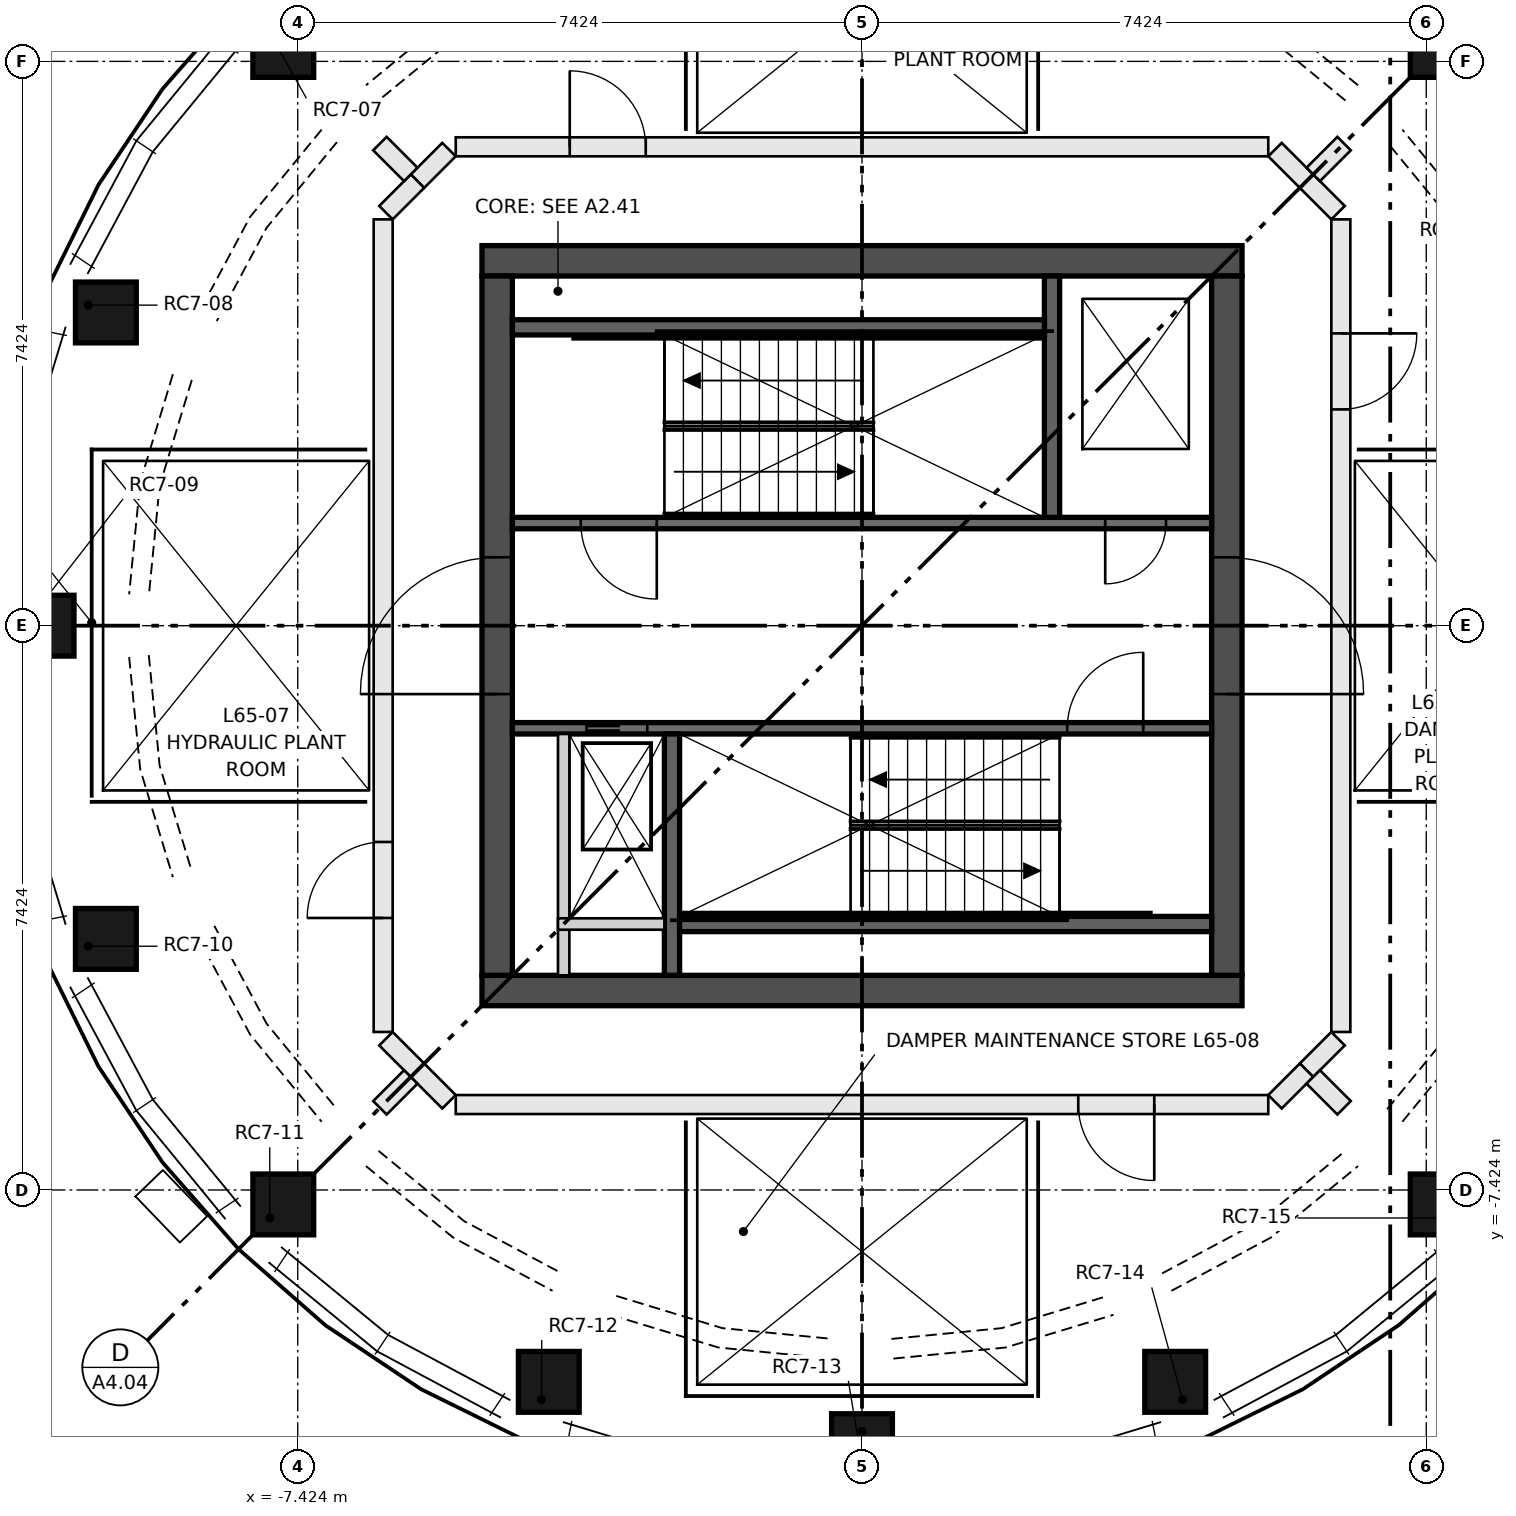
"""IFC4 building model, lengths in metres.
Left out: names, types, materials, properties, quantities, classifications, styles, units other than length and angle.
Written with IfcOpenShell. Run it as: python <this file> out.ifc"""

import sys

from ifc_helpers import new_model, si_unit, direction, frame, frame_2d, origin, origin_2d, place, context, subcontext, project, spatial, rectangle, extrude, element, fill, save


model = new_model("IFC4")
c1 = context("Model", 3, precision=1e-05, world=origin(), true_north=direction((0.0, 1.0)))
c2 = subcontext(c1, "Body", "Model", "MODEL_VIEW")
j1 = project(units=[si_unit("LENGTHUNIT", "METRE"), si_unit("PLANEANGLEUNIT", "RADIAN")], contexts=[c1])
p1 = place(None, origin())
s1 = spatial("IfcSite", under=j1, at=p1, CompositionType="ELEMENT")
p2 = place(p1, origin())
s2 = spatial("IfcBuilding", under=s1, at=p2, CompositionType="ELEMENT")
p3 = place(p2, frame((0.0, 0.0, 239.4)))
s3 = spatial("IfcBuildingStorey", under=s2, at=p3, CompositionType="ELEMENT", Elevation=239.4)
for number, where, z_axis, x_axis in (
    (1, (7.792, 7.792, 0.5), (0.0, 0.0, 1.0), (0.707, -0.707, 0.0)),
    (2, (-7.792, 7.792, 0.5), (0.0, 0.0, 1.0), (0.707, 0.707, 0.0)),
):
    element("IfcColumn", number, at=place(p3, frame(where, z_axis=z_axis, x_axis=x_axis)), inside=s3, PredefinedType="COLUMN", context=c2, shape_type="SweptSolid", body=[
        extrude(rectangle(XDim=0.8, YDim=0.8, at=origin_2d()), origin(), (0.0, -0.339, 0.941), 4.251),
    ])
p4 = place(p3, frame((-10.181, 4.217, 0.5), z_axis=(0.0, 0.0, 1.0), x_axis=(0.382820947077, 0.923822560062, 0.0)))
e3 = element("IfcColumn", 3, at=p4, inside=s3, PredefinedType="COLUMN", context=c2, shape_type="SweptSolid", body=[
    extrude(rectangle(XDim=0.8, YDim=0.8, at=origin_2d()), origin(), (0.0, -0.339, 0.941), 4.251),
])
p5 = place(p3, frame((-11.02, 0.0, 0.5), z_axis=(0.0, 0.0, 1.0), x_axis=(0.0, 1.0, 0.0)))
e4 = element("IfcColumn", 4, at=p5, inside=s3, PredefinedType="COLUMN", context=c2, shape_type="SweptSolid", body=[
    extrude(rectangle(XDim=0.8, YDim=0.8, at=origin_2d()), origin(), (0.0, -0.339, 0.941), 4.251),
])
p6 = place(p3, frame((-10.181, -4.217, 0.5), z_axis=(0.0, 0.0, 1.0), x_axis=(-0.382820947077, 0.923822560062, 0.0)))
e5 = element("IfcColumn", 5, at=p6, inside=s3, PredefinedType="COLUMN", context=c2, shape_type="SweptSolid", body=[
    extrude(rectangle(XDim=0.8, YDim=0.8, at=origin_2d()), origin(), (0.0, -0.339, 0.941), 4.251),
])
p7 = place(p3, frame((-7.792, -7.792, 0.5), z_axis=(0.0, 0.0, 1.0), x_axis=(-0.707106781187, 0.707106781187, 0.0)))
e6 = element("IfcColumn", 6, at=p7, inside=s3, PredefinedType="COLUMN", context=c2, shape_type="SweptSolid", body=[
    extrude(rectangle(XDim=0.8, YDim=0.8, at=origin_2d()), origin(), (0.0, -0.339, 0.941), 4.251),
])
p8 = place(p3, frame((-4.217, -10.181, 0.5), z_axis=(0.0, 0.0, 1.0), x_axis=(-0.923822560062, 0.382820947077, 0.0)))
e7 = element("IfcColumn", 7, at=p8, inside=s3, PredefinedType="COLUMN", context=c2, shape_type="SweptSolid", body=[
    extrude(rectangle(XDim=0.8, YDim=0.8, at=origin_2d()), origin(), (0.0, -0.339, 0.941), 4.251),
])
p9 = place(p3, frame((0.0, -11.02, 0.5), z_axis=(0.0, 0.0, 1.0), x_axis=(-1.0, 0.0, 0.0)))
e8 = element("IfcColumn", 8, at=p9, inside=s3, PredefinedType="COLUMN", context=c2, shape_type="SweptSolid", body=[
    extrude(rectangle(XDim=0.8, YDim=0.8, at=origin_2d()), origin(), (0.0, -0.339, 0.941), 4.251),
])
p10 = place(p3, frame((4.217, -10.181, 0.5), z_axis=(0.0, 0.0, 1.0), x_axis=(-0.923822560062, -0.382820947077, 0.0)))
e9 = element("IfcColumn", 9, at=p10, inside=s3, PredefinedType="COLUMN", context=c2, shape_type="SweptSolid", body=[
    extrude(rectangle(XDim=0.8, YDim=0.8, at=origin_2d()), origin(), (0.0, -0.339, 0.941), 4.251),
])
p11 = place(p3, frame((7.792, -7.792, 0.5), z_axis=(0.0, 0.0, 1.0), x_axis=(-0.707106781187, -0.707106781187, 0.0)))
e10 = element("IfcColumn", 10, at=p11, inside=s3, PredefinedType="COLUMN", context=c2, shape_type="SweptSolid", body=[
    extrude(rectangle(XDim=0.8, YDim=0.8, at=origin_2d()), origin(), (0.0, -0.339, 0.941), 4.251),
])
for number, where, z_axis, x_axis in (
    (11, (-5.0, -4.8, 0.0), (0.0, 0.0, 1.0), (1.0, 0.0, 0.0)),
    (12, (-5.0, 4.8, 0.0), (0.0, 0.0, 1.0), (1.0, 0.0, 0.0)),
):
    element("IfcWall", number, at=place(p3, frame(where, z_axis=z_axis, x_axis=x_axis)), inside=s3, PredefinedType="SHEAR", context=c2, shape_type="SweptSolid", body=[
        extrude(rectangle(XDim=10.0, YDim=0.4, at=frame_2d((5.0, 0.0))), origin(), (0.0, 0.0, 1.0), 4.65),
    ])
p12 = place(p3, frame((-4.8, -4.6, 0.0), z_axis=(0.0, 0.0, 1.0), x_axis=(0.0, 1.0, 0.0)))
e13 = element("IfcWall", 13, at=p12, inside=s3, PredefinedType="SHEAR", context=c2, shape_type="SweptSolid", body=[
    extrude(rectangle(XDim=9.2, YDim=0.4, at=frame_2d((4.6, 0.0))), origin(), (0.0, 0.0, 1.0), 4.65),
])
p13 = place(p12, frame((3.7, 0.0, 0.0)))
e14 = element("IfcOpeningElement", 14, at=p13, cuts=e13, PredefinedType="OPENING", context=c2, shape_type="SweptSolid", body=[
    extrude(rectangle(XDim=1.8, YDim=2.1, at=frame_2d((0.9, 1.05))), frame((0.0, 0.21, 0.0), z_axis=(0.0, -1.0, 0.0), x_axis=(1.0, 0.0, 0.0)), (0.0, 0.0, 1.0), 0.42),
])
p14 = place(p3, frame((4.8, -4.6, 0.0), z_axis=(0.0, 0.0, 1.0), x_axis=(0.0, 1.0, 0.0)))
e15 = element("IfcWall", 15, at=p14, inside=s3, PredefinedType="SHEAR", context=c2, shape_type="SweptSolid", body=[
    extrude(rectangle(XDim=9.2, YDim=0.4, at=frame_2d((4.6, 0.0))), origin(), (0.0, 0.0, 1.0), 4.65),
])
p15 = place(p14, frame((3.7, 0.0, 0.0)))
e16 = element("IfcOpeningElement", 16, at=p15, cuts=e15, PredefinedType="OPENING", context=c2, shape_type="SweptSolid", body=[
    extrude(rectangle(XDim=1.8, YDim=2.1, at=frame_2d((0.9, 1.05))), frame((0.0, 0.21, 0.0), z_axis=(0.0, -1.0, 0.0), x_axis=(1.0, 0.0, 0.0)), (0.0, 0.0, 1.0), 0.42),
])
p16 = place(p3, frame((-4.6, 1.35, 0.0), z_axis=(0.0, 0.0, 1.0), x_axis=(1.0, 0.0, 0.0)))
e17 = element("IfcWall", 17, at=p16, inside=s3, PredefinedType="SHEAR", context=c2, shape_type="SweptSolid", body=[
    extrude(rectangle(XDim=9.2, YDim=0.15, at=frame_2d((4.6, 0.0))), origin(), (0.0, 0.0, 1.0), 4.65),
])
p17 = place(p16, frame((0.9, 0.0, 0.0)))
e18 = element("IfcOpeningElement", 18, at=p17, cuts=e17, PredefinedType="OPENING", context=c2, shape_type="SweptSolid", body=[
    extrude(rectangle(XDim=1.0, YDim=2.1, at=frame_2d((0.5, 1.05))), frame((0.0, 0.085, 0.0), z_axis=(0.0, -1.0, 0.0), x_axis=(1.0, 0.0, 0.0)), (0.0, 0.0, 1.0), 0.17),
])
p18 = place(p16, frame((7.8, 0.0, 0.0)))
e19 = element("IfcOpeningElement", 19, at=p18, cuts=e17, PredefinedType="OPENING", context=c2, shape_type="SweptSolid", body=[
    extrude(rectangle(XDim=0.8, YDim=2.1, at=frame_2d((0.4, 1.05))), frame((0.0, 0.085, 0.0), z_axis=(0.0, -1.0, 0.0), x_axis=(1.0, 0.0, 0.0)), (0.0, 0.0, 1.0), 0.17),
])
p19 = place(p3, frame((-4.6, -1.35, 0.0), z_axis=(0.0, 0.0, 1.0), x_axis=(1.0, 0.0, 0.0)))
e20 = element("IfcWall", 20, at=p19, inside=s3, PredefinedType="SHEAR", context=c2, shape_type="SweptSolid", body=[
    extrude(rectangle(XDim=9.2, YDim=0.15, at=frame_2d((4.6, 0.0))), origin(), (0.0, 0.0, 1.0), 4.65),
])
p20 = place(p19, frame((0.975, 0.0, 0.0)))
e21 = element("IfcOpeningElement", 21, at=p20, cuts=e20, PredefinedType="OPENING", context=c2, shape_type="SweptSolid", body=[
    extrude(rectangle(XDim=0.8, YDim=2.1, at=frame_2d((0.4, 1.05))), frame((0.0, 0.085, 0.0), z_axis=(0.0, -1.0, 0.0), x_axis=(1.0, 0.0, 0.0)), (0.0, 0.0, 1.0), 0.17),
])
p21 = place(p19, frame((7.3, 0.0, 0.0)))
e22 = element("IfcOpeningElement", 22, at=p21, cuts=e20, PredefinedType="OPENING", context=c2, shape_type="SweptSolid", body=[
    extrude(rectangle(XDim=1.0, YDim=2.1, at=frame_2d((0.5, 1.05))), frame((0.0, 0.085, 0.0), z_axis=(0.0, -1.0, 0.0), x_axis=(1.0, 0.0, 0.0)), (0.0, 0.0, 1.0), 0.17),
])
for number, where, z_axis, x_axis in (
    (23, (2.5, 1.425, 0.0), (0.0, 0.0, 1.0), (0.0, 1.0, 0.0)),
    (24, (-2.5, -1.425, 0.0), (0.0, 0.0, 1.0), (0.0, -1.0, 0.0)),
):
    element("IfcWall", number, at=place(p3, frame(where, z_axis=z_axis, x_axis=x_axis)), inside=s3, PredefinedType="SHEAR", context=c2, shape_type="SweptSolid", body=[
        extrude(rectangle(XDim=3.175, YDim=0.2, at=frame_2d((1.587, 0.0))), origin(), (0.0, 0.0, 1.0), 4.65),
    ])
for number, where, z_axis, x_axis in (
    (25, (-4.6, 3.925, 0.0), (0.0, 0.0, 1.0), (1.0, 0.0, 0.0)),
    (26, (4.6, -3.925, 0.0), (0.0, 0.0, 1.0), (-1.0, 0.0, 0.0)),
):
    element("IfcWall", number, at=place(p3, frame(where, z_axis=z_axis, x_axis=x_axis)), inside=s3, PredefinedType="SHEAR", context=c2, shape_type="SweptSolid", body=[
        extrude(rectangle(XDim=7.0, YDim=0.2, at=frame_2d((3.5, 0.0))), origin(), (0.0, 0.0, 1.0), 4.65),
    ])
p22 = place(p3, frame((-3.925, -4.6, 0.0), z_axis=(0.0, 0.0, 1.0), x_axis=(0.0, 1.0, 0.0)))
e27 = element("IfcWall", 27, at=p22, inside=s3, PredefinedType="PARTITIONING", context=c2, shape_type="SweptSolid", body=[
    extrude(rectangle(XDim=3.175, YDim=0.15, at=frame_2d((1.587, 0.0))), origin(), (0.0, 0.0, 1.0), 4.65),
])
p23 = place(p3, frame((-4.0, -3.925, 0.0), z_axis=(0.0, 0.0, 1.0), x_axis=(1.0, 0.0, 0.0)))
e28 = element("IfcWall", 28, at=p23, inside=s3, PredefinedType="PARTITIONING", context=c2, shape_type="SweptSolid", body=[
    extrude(rectangle(XDim=1.4, YDim=0.15, at=frame_2d((0.7, 0.0))), origin(), (0.0, 0.0, 1.0), 4.65),
])
for number, where, z_axis, x_axis in (
    (29, (5.848, 5.848, 0.0), (0.0, 0.0, 1.0), (0.707, -0.707, 0.0)),
    (30, (6.263, -5.434, 0.0), (0.0, 0.0, 1.0), (-0.707, -0.707, 0.0)),
):
    element("IfcWall", number, at=place(p3, frame(where, z_axis=z_axis, x_axis=x_axis)), inside=s3, PredefinedType="PARTITIONING", context=c2, shape_type="SweptSolid", body=[
        extrude(rectangle(XDim=0.587, YDim=0.25, at=frame_2d((0.293, 0.0))), origin(), (0.0, 0.0, 1.0), 4.65),
    ])
p24 = place(p3, frame((6.3, 5.345, 0.0), z_axis=(0.0, 0.0, 1.0), x_axis=(0.0, -1.0, 0.0)))
e31 = element("IfcWall", 31, at=p24, inside=s3, PredefinedType="PARTITIONING", context=c2, shape_type="SweptSolid", body=[
    extrude(rectangle(XDim=10.69, YDim=0.25, at=frame_2d((5.345, 0.0))), origin(), (0.0, 0.0, 1.0), 4.65),
])
p25 = place(p24, frame((1.5, 0.0, 0.0)))
e32 = element("IfcOpeningElement", 32, at=p25, cuts=e31, PredefinedType="OPENING", context=c2, shape_type="SweptSolid", body=[
    extrude(rectangle(XDim=1.0, YDim=2.1, at=frame_2d((0.5, 1.05))), frame((0.0, 0.135, 0.0), z_axis=(0.0, -1.0, 0.0), x_axis=(1.0, 0.0, 0.0)), (0.0, 0.0, 1.0), 0.27),
])
p26 = place(p3, frame((-5.848, 5.848, 0.0), z_axis=(0.0, 0.0, 1.0), x_axis=(0.706898716824, 0.707314784344, 0.0)))
e33 = element("IfcWall", 33, at=p26, inside=s3, PredefinedType="PARTITIONING", context=c2, shape_type="SweptSolid", body=[
    extrude(rectangle(XDim=0.587, YDim=0.25, at=frame_2d((0.293, 0.0))), origin(), (0.0, 0.0, 1.0), 4.65),
])
p27 = place(p3, frame((-5.345, 6.3, 0.0), z_axis=(0.0, 0.0, 1.0), x_axis=(1.0, 0.0, 0.0)))
e34 = element("IfcWall", 34, at=p27, inside=s3, PredefinedType="PARTITIONING", context=c2, shape_type="SweptSolid", body=[
    extrude(rectangle(XDim=10.69, YDim=0.25, at=frame_2d((5.345, 0.0))), origin(), (0.0, 0.0, 1.0), 4.65),
])
p28 = place(p27, frame((1.5, 0.0, 0.0)))
e35 = element("IfcOpeningElement", 35, at=p28, cuts=e34, PredefinedType="OPENING", context=c2, shape_type="SweptSolid", body=[
    extrude(rectangle(XDim=1.0, YDim=2.1, at=frame_2d((0.5, 1.05))), frame((0.0, 0.135, 0.0), z_axis=(0.0, -1.0, 0.0), x_axis=(1.0, 0.0, 0.0)), (0.0, 0.0, 1.0), 0.27),
])
p29 = place(p3, frame((5.434, 6.263, 0.0), z_axis=(0.0, 0.0, 1.0), x_axis=(0.706898716824, -0.707314784344, 0.0)))
e36 = element("IfcWall", 36, at=p29, inside=s3, PredefinedType="PARTITIONING", context=c2, shape_type="SweptSolid", body=[
    extrude(rectangle(XDim=0.587, YDim=0.25, at=frame_2d((0.293, 0.0))), origin(), (0.0, 0.0, 1.0), 4.65),
])
p30 = place(p3, frame((-6.3, -5.345, 0.0), z_axis=(0.0, 0.0, 1.0), x_axis=(0.0, 1.0, 0.0)))
e37 = element("IfcWall", 37, at=p30, inside=s3, PredefinedType="PARTITIONING", context=c2, shape_type="SweptSolid", body=[
    extrude(rectangle(XDim=10.69, YDim=0.25, at=frame_2d((5.345, 0.0))), origin(), (0.0, 0.0, 1.0), 4.65),
])
p31 = place(p30, frame((1.5, 0.0, 0.0)))
e38 = element("IfcOpeningElement", 38, at=p31, cuts=e37, PredefinedType="OPENING", context=c2, shape_type="SweptSolid", body=[
    extrude(rectangle(XDim=1.0, YDim=2.1, at=frame_2d((0.5, 1.05))), frame((0.0, 0.135, 0.0), z_axis=(0.0, -1.0, 0.0), x_axis=(1.0, 0.0, 0.0)), (0.0, 0.0, 1.0), 0.27),
])
for number, where, z_axis, x_axis in (
    (39, (-6.263, 5.434, 0.0), (0.0, 0.0, 1.0), (0.707, 0.707, 0.0)),
    (40, (-5.848, -5.848, 0.0), (0.0, 0.0, 1.0), (-0.707, 0.707, 0.0)),
    (41, (-5.434, -6.263, 0.0), (0.0, 0.0, 1.0), (-0.707, 0.707, 0.0)),
):
    element("IfcWall", number, at=place(p3, frame(where, z_axis=z_axis, x_axis=x_axis)), inside=s3, PredefinedType="PARTITIONING", context=c2, shape_type="SweptSolid", body=[
        extrude(rectangle(XDim=0.587, YDim=0.25, at=frame_2d((0.293, 0.0))), origin(), (0.0, 0.0, 1.0), 4.65),
    ])
p32 = place(p3, frame((5.345, -6.3, 0.0), z_axis=(0.0, 0.0, 1.0), x_axis=(-1.0, 0.0, 0.0)))
e42 = element("IfcWall", 42, at=p32, inside=s3, PredefinedType="PARTITIONING", context=c2, shape_type="SweptSolid", body=[
    extrude(rectangle(XDim=10.69, YDim=0.25, at=frame_2d((5.345, 0.0))), origin(), (0.0, 0.0, 1.0), 4.65),
])
p33 = place(p32, frame((1.5, 0.0, 0.0)))
e43 = element("IfcOpeningElement", 43, at=p33, cuts=e42, PredefinedType="OPENING", context=c2, shape_type="SweptSolid", body=[
    extrude(rectangle(XDim=1.0, YDim=2.1, at=frame_2d((0.5, 1.05))), frame((0.0, 0.135, 0.0), z_axis=(0.0, -1.0, 0.0), x_axis=(1.0, 0.0, 0.0)), (0.0, 0.0, 1.0), 0.27),
])
p34 = place(p3, frame((5.848, -5.848, 0.0), z_axis=(0.0, 0.0, 1.0), x_axis=(-0.706898716824, -0.707314784344, 0.0)))
e44 = element("IfcWall", 44, at=p34, inside=s3, PredefinedType="PARTITIONING", context=c2, shape_type="SweptSolid", body=[
    extrude(rectangle(XDim=0.587, YDim=0.25, at=frame_2d((0.293, 0.0))), origin(), (0.0, 0.0, 1.0), 4.65),
])
for number, where, z_axis, x_axis in (
    (45, (5.937, 5.937, 0.0), (0.0, 0.0, 1.0), (0.707, 0.707, 0.0)),
    (46, (6.343, -6.343, 0.0), (0.0, 0.0, 1.0), (-0.707, 0.707, 0.0)),
    (47, (-5.937, 5.937, 0.0), (0.0, 0.0, 1.0), (-0.707, 0.707, 0.0)),
    (48, (-5.937, -5.937, 0.0), (0.0, 0.0, 1.0), (-0.707, -0.707, 0.0)),
):
    element("IfcWall", number, at=place(p3, frame(where, z_axis=z_axis, x_axis=x_axis)), inside=s3, PredefinedType="PARTITIONING", context=c2, shape_type="SweptSolid", body=[
        extrude(rectangle(XDim=0.574, YDim=0.25, at=frame_2d((0.287, 0.0))), origin(), (0.0, 0.0, 1.0), 4.65),
    ])
p35 = place(p20, origin())
e49 = element("IfcDoor", 49, at=p35, inside=s3, OperationType="DOUBLE_DOOR_SLIDING", PredefinedType="DOOR", context=c2, shape_type="SweptSolid", body=[
    extrude(rectangle(XDim=0.8, YDim=2.1, at=frame_2d((0.4, 1.05))), frame((0.0, 0.025, 0.0), z_axis=(0.0, -1.0, 0.0), x_axis=(1.0, 0.0, 0.0)), (0.0, 0.0, 1.0), 0.05),
])
fill(e21, e49)
p36 = place(p17, frame((1.0, 0.0, 0.0), z_axis=(0.0, 0.0, 1.0), x_axis=(-1.0, 0.0, 0.0)))
e50 = element("IfcDoor", 50, at=p36, inside=s3, OperationType="SINGLE_SWING_RIGHT", PredefinedType="DOOR", context=c2, shape_type="SweptSolid", body=[
    extrude(rectangle(XDim=1.0, YDim=2.1, at=frame_2d((0.5, 1.05))), frame((0.0, 0.025, 0.0), z_axis=(0.0, -1.0, 0.0), x_axis=(1.0, 0.0, 0.0)), (0.0, 0.0, 1.0), 0.05),
])
fill(e18, e50)
p37 = place(p21, origin())
e51 = element("IfcDoor", 51, at=p37, inside=s3, OperationType="SINGLE_SWING_RIGHT", PredefinedType="DOOR", context=c2, shape_type="SweptSolid", body=[
    extrude(rectangle(XDim=1.0, YDim=2.1, at=frame_2d((0.5, 1.05))), frame((0.0, 0.025, 0.0), z_axis=(0.0, -1.0, 0.0), x_axis=(1.0, 0.0, 0.0)), (0.0, 0.0, 1.0), 0.05),
])
fill(e22, e51)
p38 = place(p18, frame((0.8, 0.0, 0.0), z_axis=(0.0, 0.0, 1.0), x_axis=(-1.0, 0.0, 0.0)))
e52 = element("IfcDoor", 52, at=p38, inside=s3, OperationType="SINGLE_SWING_LEFT", PredefinedType="DOOR", context=c2, shape_type="SweptSolid", body=[
    extrude(rectangle(XDim=0.8, YDim=2.1, at=frame_2d((0.4, 1.05))), frame((0.0, 0.025, 0.0), z_axis=(0.0, -1.0, 0.0), x_axis=(1.0, 0.0, 0.0)), (0.0, 0.0, 1.0), 0.05),
])
fill(e19, e52)
p39 = place(p13, origin())
e53 = element("IfcDoor", 53, at=p39, inside=s3, OperationType="DOUBLE_DOOR_SINGLE_SWING", PredefinedType="DOOR", context=c2, shape_type="SweptSolid", body=[
    extrude(rectangle(XDim=1.8, YDim=2.1, at=frame_2d((0.9, 1.05))), frame((0.0, 0.025, 0.0), z_axis=(0.0, -1.0, 0.0), x_axis=(1.0, 0.0, 0.0)), (0.0, 0.0, 1.0), 0.05),
])
fill(e14, e53)
p40 = place(p15, frame((1.8, 0.0, 0.0), z_axis=(0.0, 0.0, 1.0), x_axis=(-1.0, 0.0, 0.0)))
e54 = element("IfcDoor", 54, at=p40, inside=s3, OperationType="DOUBLE_DOOR_SINGLE_SWING", PredefinedType="DOOR", context=c2, shape_type="SweptSolid", body=[
    extrude(rectangle(XDim=1.8, YDim=2.1, at=frame_2d((0.9, 1.05))), frame((0.0, 0.025, 0.0), z_axis=(0.0, -1.0, 0.0), x_axis=(1.0, 0.0, 0.0)), (0.0, 0.0, 1.0), 0.05),
])
fill(e16, e54)
p41 = place(p25, origin())
e55 = element("IfcDoor", 55, at=p41, inside=s3, OperationType="SINGLE_SWING_LEFT", PredefinedType="DOOR", context=c2, shape_type="SweptSolid", body=[
    extrude(rectangle(XDim=1.0, YDim=2.1, at=frame_2d((0.5, 1.05))), frame((0.0, 0.025, 0.0), z_axis=(0.0, -1.0, 0.0), x_axis=(1.0, 0.0, 0.0)), (0.0, 0.0, 1.0), 0.05),
])
fill(e32, e55)
p42 = place(p28, origin())
e56 = element("IfcDoor", 56, at=p42, inside=s3, OperationType="SINGLE_SWING_LEFT", PredefinedType="DOOR", context=c2, shape_type="SweptSolid", body=[
    extrude(rectangle(XDim=1.0, YDim=2.1, at=frame_2d((0.5, 1.05))), frame((0.0, 0.025, 0.0), z_axis=(0.0, -1.0, 0.0), x_axis=(1.0, 0.0, 0.0)), (0.0, 0.0, 1.0), 0.05),
])
fill(e35, e56)
p43 = place(p31, origin())
e57 = element("IfcDoor", 57, at=p43, inside=s3, OperationType="SINGLE_SWING_LEFT", PredefinedType="DOOR", context=c2, shape_type="SweptSolid", body=[
    extrude(rectangle(XDim=1.0, YDim=2.1, at=frame_2d((0.5, 1.05))), frame((0.0, 0.025, 0.0), z_axis=(0.0, -1.0, 0.0), x_axis=(1.0, 0.0, 0.0)), (0.0, 0.0, 1.0), 0.05),
])
fill(e38, e57)
p44 = place(p33, origin())
e58 = element("IfcDoor", 58, at=p44, inside=s3, OperationType="SINGLE_SWING_LEFT", PredefinedType="DOOR", context=c2, shape_type="SweptSolid", body=[
    extrude(rectangle(XDim=1.0, YDim=2.1, at=frame_2d((0.5, 1.05))), frame((0.0, 0.025, 0.0), z_axis=(0.0, -1.0, 0.0), x_axis=(1.0, 0.0, 0.0)), (0.0, 0.0, 1.0), 0.05),
])
fill(e43, e58)
save(model, sys.argv[1])
